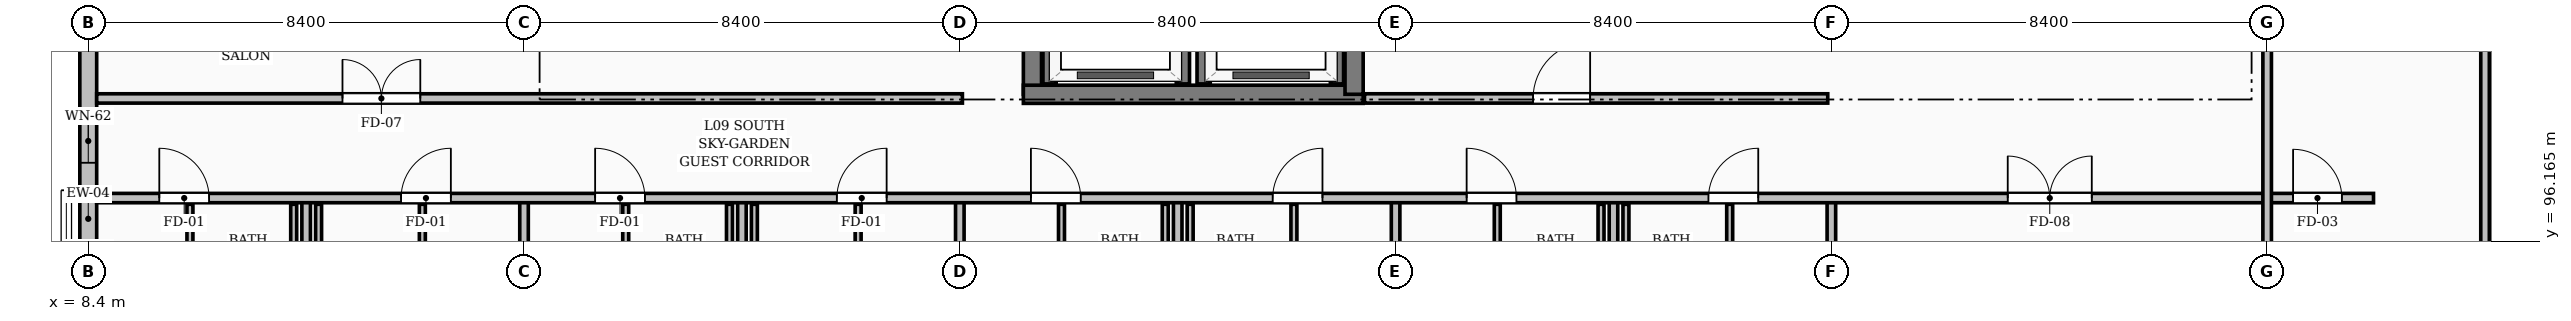
"""IFC4 building model, lengths in metres.
Left out: names, types, materials, properties, quantities, classifications, styles, units other than length and angle.
Written with IfcOpenShell. Run it as: python <this file> out.ifc"""

import sys

from ifc_helpers import new_model, si_unit, direction, frame, frame_2d, origin, place, context, subcontext, project, spatial, rectangle, extrude, element, fill, save


model = new_model("IFC4")
c1 = context("Model", 3, precision=1e-05, world=origin(), true_north=direction((0.0, 1.0)))
c2 = subcontext(c1, "Body", "Model", "MODEL_VIEW")
j1 = project(units=[si_unit("LENGTHUNIT", "METRE"), si_unit("PLANEANGLEUNIT", "RADIAN")], contexts=[c1])
p1 = place(None, origin())
s1 = spatial("IfcSite", under=j1, at=p1, CompositionType="ELEMENT")
p2 = place(p1, origin())
s2 = spatial("IfcBuilding", under=s1, at=p2, CompositionType="ELEMENT")
p3 = place(p2, frame((0.0, 0.0, 31.92)))
s3 = spatial("IfcBuildingStorey", under=s2, at=p3, CompositionType="ELEMENT", Elevation=31.92)
p4 = place(p3, frame((26.6, 99.0, 0.0), z_axis=(0.0, 0.0, 1.0), x_axis=(0.0, 1.0, 0.0)))
e1 = element("IfcWall", 1, at=p4, inside=s3, PredefinedType="SHEAR", context=c2, shape_type="SweptSolid", body=[
    extrude(rectangle(XDim=6.15, YDim=0.35, at=frame_2d((3.075, 0.0))), origin(), (0.0, 0.0, 1.0), 3.1),
])
p5 = place(p3, frame((26.425, 99.0, 0.0), z_axis=(0.0, 0.0, 1.0), x_axis=(1.0, 0.0, 0.0)))
e2 = element("IfcWall", 2, at=p5, inside=s3, PredefinedType="SHEAR", context=c2, shape_type="SweptSolid", body=[
    extrude(rectangle(XDim=6.55, YDim=0.35, at=frame_2d((3.275, 0.0))), origin(), (0.0, 0.0, 1.0), 3.1),
])
p6 = place(p3, frame((32.8, 99.0, 0.0), z_axis=(0.0, 0.0, 1.0), x_axis=(0.0, 1.0, 0.0)))
e3 = element("IfcWall", 3, at=p6, inside=s3, PredefinedType="SHEAR", context=c2, shape_type="SweptSolid", body=[
    extrude(rectangle(XDim=6.15, YDim=0.35, at=frame_2d((3.075, 0.0))), origin(), (0.0, 0.0, 1.0), 3.1),
])
p7 = place(p3, frame((8.4, 92.701, 0.0), z_axis=(0.0, 0.0, 1.0), x_axis=(0.0, 1.0, 0.0)))
e4 = element("IfcWall", 4, at=p7, inside=s3, PredefinedType="SOLIDWALL", context=c2, shape_type="SweptSolid", body=[
    extrude(rectangle(XDim=7.798, YDim=0.325, at=frame_2d((3.899, 0.0))), origin(), (0.0, 0.0, 1.0), 2.474),
])
p8 = place(p7, frame((2.429, 0.0, 0.3)))
e5 = element("IfcOpeningElement", 5, at=p8, cuts=e4, PredefinedType="OPENING", context=c2, shape_type="SweptSolid", body=[
    extrude(rectangle(XDim=0.84, YDim=1.75, at=frame_2d((0.42, 0.875))), frame((0.0, 0.172, 0.0), z_axis=(0.0, -1.0, 0.0), x_axis=(1.0, 0.0, 0.0)), (0.0, 0.0, 1.0), 0.345),
])
p9 = place(p7, frame((4.979, 0.0, 0.3)))
e6 = element("IfcOpeningElement", 6, at=p9, cuts=e4, PredefinedType="OPENING", context=c2, shape_type="SweptSolid", body=[
    extrude(rectangle(XDim=0.84, YDim=1.75, at=frame_2d((0.42, 0.875))), frame((0.0, 0.172, 0.0), z_axis=(0.0, -1.0, 0.0), x_axis=(1.0, 0.0, 0.0)), (0.0, 0.0, 1.0), 0.345),
])
for number, where, z_axis, x_axis in (
    (7, (26.93, 99.2, 0.0), (0.0, 0.0, 1.0), (0.0, 1.0, 0.0)),
    (8, (29.5, 99.2, 0.0), (0.0, 0.0, 1.0), (0.0, 1.0, 0.0)),
    (9, (29.9, 99.2, 0.0), (0.0, 0.0, 1.0), (0.0, 1.0, 0.0)),
    (10, (32.47, 99.2, 0.0), (0.0, 0.0, 1.0), (0.0, 1.0, 0.0)),
):
    element("IfcWall", number, at=place(p3, frame(where, z_axis=z_axis, x_axis=x_axis)), inside=s3, PredefinedType="SOLIDWALL", context=c2, shape_type="SweptSolid", body=[
        extrude(rectangle(XDim=2.2, YDim=0.255, at=frame_2d((1.1, 0.0))), origin(), (0.0, 0.0, 1.0), 3.1),
    ])
p10 = place(p3, frame((10.36, 94.73, 0.0), z_axis=(0.0, 0.0, 1.0), x_axis=(0.0, 1.0, 0.0)))
e11 = element("IfcWall", 11, at=p10, inside=s3, PredefinedType="PARTITIONING", context=c2, shape_type="SweptSolid", body=[
    extrude(rectangle(XDim=2.15, YDim=0.115, at=frame_2d((1.075, 0.0))), origin(), (0.0, 0.0, 1.0), 2.622),
])
for number, where, z_axis, x_axis in (
    (12, (12.36, 94.73, 0.0), (0.0, 0.0, 1.0), (0.0, 1.0, 0.0)),
    (13, (12.84, 94.73, 0.0), (0.0, 0.0, 1.0), (0.0, 1.0, 0.0)),
):
    element("IfcWall", number, at=place(p3, frame(where, z_axis=z_axis, x_axis=x_axis)), inside=s3, PredefinedType="PARTITIONING", context=c2, shape_type="SweptSolid", body=[
        extrude(rectangle(XDim=2.15, YDim=0.115, at=frame_2d((1.075, 0.0))), origin(), (0.0, 0.0, 1.0), 3.1),
    ])
p11 = place(p3, frame((14.84, 94.73, 0.0), z_axis=(0.0, 0.0, 1.0), x_axis=(0.0, 1.0, 0.0)))
e14 = element("IfcWall", 14, at=p11, inside=s3, PredefinedType="PARTITIONING", context=c2, shape_type="SweptSolid", body=[
    extrude(rectangle(XDim=2.15, YDim=0.115, at=frame_2d((1.075, 0.0))), origin(), (0.0, 0.0, 1.0), 2.622),
])
p12 = place(p3, frame((12.6, 92.562, 0.0), z_axis=(0.0, 0.0, 1.0), x_axis=(0.0, 1.0, 0.0)))
e15 = element("IfcWall", 15, at=p12, inside=s3, PredefinedType="PARTITIONING", context=c2, shape_type="SweptSolid", body=[
    extrude(rectangle(XDim=4.438, YDim=0.165, at=frame_2d((2.219, 0.0))), origin(), (0.0, 0.0, 1.0), 3.1),
])
for number, where, z_axis, x_axis in (
    (16, (18.76, 94.73, 0.0), (0.0, 0.0, 1.0), (0.0, 1.0, 0.0)),
    (17, (20.76, 94.73, 0.0), (0.0, 0.0, 1.0), (0.0, 1.0, 0.0)),
    (18, (21.24, 94.73, 0.0), (0.0, 0.0, 1.0), (0.0, 1.0, 0.0)),
    (19, (23.24, 94.73, 0.0), (0.0, 0.0, 1.0), (0.0, 1.0, 0.0)),
):
    element("IfcWall", number, at=place(p3, frame(where, z_axis=z_axis, x_axis=x_axis)), inside=s3, PredefinedType="PARTITIONING", context=c2, shape_type="SweptSolid", body=[
        extrude(rectangle(XDim=2.15, YDim=0.115, at=frame_2d((1.075, 0.0))), origin(), (0.0, 0.0, 1.0), 3.1),
    ])
p13 = place(p3, frame((21.0, 92.575, 0.0), z_axis=(0.0, 0.0, 1.0), x_axis=(0.0, 1.0, 0.0)))
e20 = element("IfcWall", 20, at=p13, inside=s3, PredefinedType="PARTITIONING", context=c2, shape_type="SweptSolid", body=[
    extrude(rectangle(XDim=4.425, YDim=0.165, at=frame_2d((2.212, 0.0))), origin(), (0.0, 0.0, 1.0), 3.1),
])
p14 = place(p3, frame((16.8, 92.75, 0.0), z_axis=(0.0, 0.0, 1.0), x_axis=(0.0, 1.0, 0.0)))
e21 = element("IfcWall", 21, at=p14, inside=s3, PredefinedType="PARTITIONING", context=c2, shape_type="SweptSolid", body=[
    extrude(rectangle(XDim=4.25, YDim=0.165, at=frame_2d((2.125, 0.0))), origin(), (0.0, 0.0, 1.0), 2.435),
])
p15 = place(p3, frame((27.16, 94.73, 0.0), z_axis=(0.0, 0.0, 1.0), x_axis=(0.0, 1.0, 0.0)))
e22 = element("IfcWall", 22, at=p15, inside=s3, PredefinedType="PARTITIONING", context=c2, shape_type="SweptSolid", body=[
    extrude(rectangle(XDim=2.15, YDim=0.115, at=frame_2d((1.075, 0.0))), origin(), (0.0, 0.0, 1.0), 2.622),
])
for number, where, z_axis, x_axis in (
    (23, (29.16, 94.73, 0.0), (0.0, 0.0, 1.0), (0.0, 1.0, 0.0)),
    (24, (29.64, 94.73, 0.0), (0.0, 0.0, 1.0), (0.0, 1.0, 0.0)),
):
    element("IfcWall", number, at=place(p3, frame(where, z_axis=z_axis, x_axis=x_axis)), inside=s3, PredefinedType="PARTITIONING", context=c2, shape_type="SweptSolid", body=[
        extrude(rectangle(XDim=2.15, YDim=0.115, at=frame_2d((1.075, 0.0))), origin(), (0.0, 0.0, 1.0), 3.1),
    ])
p16 = place(p3, frame((31.64, 94.73, 0.0), z_axis=(0.0, 0.0, 1.0), x_axis=(0.0, 1.0, 0.0)))
e25 = element("IfcWall", 25, at=p16, inside=s3, PredefinedType="PARTITIONING", context=c2, shape_type="SweptSolid", body=[
    extrude(rectangle(XDim=2.15, YDim=0.115, at=frame_2d((1.075, 0.0))), origin(), (0.0, 0.0, 1.0), 2.622),
])
p17 = place(p3, frame((29.4, 92.59, 0.0), z_axis=(0.0, 0.0, 1.0), x_axis=(0.0, 1.0, 0.0)))
e26 = element("IfcWall", 26, at=p17, inside=s3, PredefinedType="PARTITIONING", context=c2, shape_type="SweptSolid", body=[
    extrude(rectangle(XDim=4.41, YDim=0.165, at=frame_2d((2.205, 0.0))), origin(), (0.0, 0.0, 1.0), 3.1),
])
p18 = place(p3, frame((25.2, 92.75, 0.0), z_axis=(0.0, 0.0, 1.0), x_axis=(0.0, 1.0, 0.0)))
e27 = element("IfcWall", 27, at=p18, inside=s3, PredefinedType="PARTITIONING", context=c2, shape_type="SweptSolid", body=[
    extrude(rectangle(XDim=4.25, YDim=0.165, at=frame_2d((2.125, 0.0))), origin(), (0.0, 0.0, 1.0), 2.435),
])
for number, where, z_axis, x_axis in (
    (28, (35.56, 94.73, 0.0), (0.0, 0.0, 1.0), (0.0, 1.0, 0.0)),
    (29, (37.56, 94.73, 0.0), (0.0, 0.0, 1.0), (0.0, 1.0, 0.0)),
    (30, (38.04, 94.73, 0.0), (0.0, 0.0, 1.0), (0.0, 1.0, 0.0)),
    (31, (40.04, 94.73, 0.0), (0.0, 0.0, 1.0), (0.0, 1.0, 0.0)),
):
    element("IfcWall", number, at=place(p3, frame(where, z_axis=z_axis, x_axis=x_axis)), inside=s3, PredefinedType="PARTITIONING", context=c2, shape_type="SweptSolid", body=[
        extrude(rectangle(XDim=2.15, YDim=0.115, at=frame_2d((1.075, 0.0))), origin(), (0.0, 0.0, 1.0), 3.1),
    ])
p19 = place(p3, frame((37.8, 92.613, 0.0), z_axis=(0.0, 0.0, 1.0), x_axis=(0.0, 1.0, 0.0)))
e32 = element("IfcWall", 32, at=p19, inside=s3, PredefinedType="PARTITIONING", context=c2, shape_type="SweptSolid", body=[
    extrude(rectangle(XDim=4.387, YDim=0.165, at=frame_2d((2.194, 0.0))), origin(), (0.0, 0.0, 1.0), 3.1),
])
for number, where, z_axis, x_axis in (
    (33, (33.6, 92.75, 0.0), (0.0, 0.0, 1.0), (0.0, 1.0, 0.0)),
    (34, (42.0, 92.75, 0.0), (0.0, 0.0, 1.0), (0.0, 1.0, 0.0)),
):
    element("IfcWall", number, at=place(p3, frame(where, z_axis=z_axis, x_axis=x_axis)), inside=s3, PredefinedType="PARTITIONING", context=c2, shape_type="SweptSolid", body=[
        extrude(rectangle(XDim=4.25, YDim=0.165, at=frame_2d((2.125, 0.0))), origin(), (0.0, 0.0, 1.0), 2.435),
    ])
p20 = place(p3, frame((8.562, 97.0, 0.0), z_axis=(0.0, 0.0, 1.0), x_axis=(1.0, 0.0, 0.0)))
e35 = element("IfcWall", 35, at=p20, inside=s3, PredefinedType="PARTITIONING", context=c2, shape_type="SweptSolid", body=[
    extrude(rectangle(XDim=41.837, YDim=0.18, at=frame_2d((20.919, 0.0))), origin(), (0.0, 0.0, 1.0), 3.1),
])
p21 = place(p20, frame((1.207, 0.0, 0.0)))
e36 = element("IfcOpeningElement", 36, at=p21, cuts=e35, PredefinedType="OPENING", context=c2, shape_type="SweptSolid", body=[
    extrude(rectangle(XDim=0.96, YDim=2.15, at=frame_2d((0.48, 1.075))), frame((0.0, 0.1, 0.0), z_axis=(0.0, -1.0, 0.0), x_axis=(1.0, 0.0, 0.0)), (0.0, 0.0, 1.0), 0.2),
])
p22 = place(p20, frame((5.867, 0.0, 0.0)))
e37 = element("IfcOpeningElement", 37, at=p22, cuts=e35, PredefinedType="OPENING", context=c2, shape_type="SweptSolid", body=[
    extrude(rectangle(XDim=0.96, YDim=2.15, at=frame_2d((0.48, 1.075))), frame((0.0, 0.1, 0.0), z_axis=(0.0, -1.0, 0.0), x_axis=(1.0, 0.0, 0.0)), (0.0, 0.0, 1.0), 0.2),
])
p23 = place(p20, frame((9.608, 0.0, 0.0)))
e38 = element("IfcOpeningElement", 38, at=p23, cuts=e35, PredefinedType="OPENING", context=c2, shape_type="SweptSolid", body=[
    extrude(rectangle(XDim=0.96, YDim=2.15, at=frame_2d((0.48, 1.075))), frame((0.0, 0.1, 0.0), z_axis=(0.0, -1.0, 0.0), x_axis=(1.0, 0.0, 0.0)), (0.0, 0.0, 1.0), 0.2),
])
p24 = place(p20, frame((14.267, 0.0, 0.0)))
e39 = element("IfcOpeningElement", 39, at=p24, cuts=e35, PredefinedType="OPENING", context=c2, shape_type="SweptSolid", body=[
    extrude(rectangle(XDim=0.96, YDim=2.15, at=frame_2d((0.48, 1.075))), frame((0.0, 0.1, 0.0), z_axis=(0.0, -1.0, 0.0), x_axis=(1.0, 0.0, 0.0)), (0.0, 0.0, 1.0), 0.2),
])
p25 = place(p20, frame((18.008, 0.0, 0.0)))
e40 = element("IfcOpeningElement", 40, at=p25, cuts=e35, PredefinedType="OPENING", context=c2, shape_type="SweptSolid", body=[
    extrude(rectangle(XDim=0.96, YDim=2.15, at=frame_2d((0.48, 1.075))), frame((0.0, 0.1, 0.0), z_axis=(0.0, -1.0, 0.0), x_axis=(1.0, 0.0, 0.0)), (0.0, 0.0, 1.0), 0.2),
])
p26 = place(p20, frame((22.668, 0.0, 0.0)))
e41 = element("IfcOpeningElement", 41, at=p26, cuts=e35, PredefinedType="OPENING", context=c2, shape_type="SweptSolid", body=[
    extrude(rectangle(XDim=0.96, YDim=2.15, at=frame_2d((0.48, 1.075))), frame((0.0, 0.1, 0.0), z_axis=(0.0, -1.0, 0.0), x_axis=(1.0, 0.0, 0.0)), (0.0, 0.0, 1.0), 0.2),
])
p27 = place(p20, frame((26.407, 0.0, 0.0)))
e42 = element("IfcOpeningElement", 42, at=p27, cuts=e35, PredefinedType="OPENING", context=c2, shape_type="SweptSolid", body=[
    extrude(rectangle(XDim=0.96, YDim=2.15, at=frame_2d((0.48, 1.075))), frame((0.0, 0.1, 0.0), z_axis=(0.0, -1.0, 0.0), x_axis=(1.0, 0.0, 0.0)), (0.0, 0.0, 1.0), 0.2),
])
p28 = place(p20, frame((31.068, 0.0, 0.0)))
e43 = element("IfcOpeningElement", 43, at=p28, cuts=e35, PredefinedType="OPENING", context=c2, shape_type="SweptSolid", body=[
    extrude(rectangle(XDim=0.96, YDim=2.15, at=frame_2d((0.48, 1.075))), frame((0.0, 0.1, 0.0), z_axis=(0.0, -1.0, 0.0), x_axis=(1.0, 0.0, 0.0)), (0.0, 0.0, 1.0), 0.2),
])
p29 = place(p20, frame((36.837, 0.0, 0.0)))
e44 = element("IfcOpeningElement", 44, at=p29, cuts=e35, PredefinedType="OPENING", context=c2, shape_type="SweptSolid", body=[
    extrude(rectangle(XDim=1.62, YDim=2.2, at=frame_2d((0.81, 1.1))), frame((0.0, 0.1, 0.0), z_axis=(0.0, -1.0, 0.0), x_axis=(1.0, 0.0, 0.0)), (0.0, 0.0, 1.0), 0.2),
])
p30 = place(p3, frame((8.562, 98.92, 0.0), z_axis=(0.0, 0.0, 1.0), x_axis=(1.0, 0.0, 0.0)))
e45 = element("IfcWall", 45, at=p30, inside=s3, PredefinedType="PARTITIONING", context=c2, shape_type="SweptSolid", body=[
    extrude(rectangle(XDim=16.688, YDim=0.18, at=frame_2d((8.344, 0.0))), origin(), (0.0, 0.0, 1.0), 3.1),
])
p31 = place(p30, frame((4.738, 0.0, 0.0)))
e46 = element("IfcOpeningElement", 46, at=p31, cuts=e45, PredefinedType="OPENING", context=c2, shape_type="SweptSolid", body=[
    extrude(rectangle(XDim=1.5, YDim=2.2, at=frame_2d((0.75, 1.1))), frame((0.0, 0.1, 0.0), z_axis=(0.0, -1.0, 0.0), x_axis=(1.0, 0.0, 0.0)), (0.0, 0.0, 1.0), 0.2),
])
p32 = place(p3, frame((33.0, 98.92, 0.0), z_axis=(0.0, 0.0, 1.0), x_axis=(1.0, 0.0, 0.0)))
e47 = element("IfcWall", 47, at=p32, inside=s3, PredefinedType="PARTITIONING", context=c2, shape_type="SweptSolid", body=[
    extrude(rectangle(XDim=8.93, YDim=0.18, at=frame_2d((4.465, 0.0))), origin(), (0.0, 0.0, 1.0), 3.1),
])
p33 = place(p32, frame((3.25, 0.0, 0.0)))
e48 = element("IfcOpeningElement", 48, at=p33, cuts=e47, PredefinedType="OPENING", context=c2, shape_type="SweptSolid", body=[
    extrude(rectangle(XDim=1.1, YDim=2.1, at=frame_2d((0.55, 1.05))), frame((0.0, 0.1, 0.0), z_axis=(0.0, -1.0, 0.0), x_axis=(1.0, 0.0, 0.0)), (0.0, 0.0, 1.0), 0.2),
])
p34 = place(p3, frame((50.4, 97.0, 0.0), z_axis=(0.0, 0.0, 1.0), x_axis=(1.0, 0.0, 0.0)))
e49 = element("IfcWall", 49, at=p34, inside=s3, PredefinedType="PARTITIONING", context=c2, shape_type="SweptSolid", body=[
    extrude(rectangle(XDim=2.05, YDim=0.18, at=frame_2d((1.025, 0.0))), origin(), (0.0, 0.0, 1.0), 3.1),
])
p35 = place(p34, frame((0.5, 0.0, 0.0)))
e50 = element("IfcOpeningElement", 50, at=p35, cuts=e49, PredefinedType="OPENING", context=c2, shape_type="SweptSolid", body=[
    extrude(rectangle(XDim=0.94, YDim=2.1, at=frame_2d((0.47, 1.05))), frame((0.0, 0.1, 0.0), z_axis=(0.0, -1.0, 0.0), x_axis=(1.0, 0.0, 0.0)), (0.0, 0.0, 1.0), 0.2),
])
p36 = place(p3, frame((54.6, 92.53, 0.0), z_axis=(0.0, 0.0, 1.0), x_axis=(0.0, 1.0, 0.0)))
e51 = element("IfcWall", 51, at=p36, inside=s3, PredefinedType="PARTITIONING", context=c2, shape_type="SweptSolid", body=[
    extrude(rectangle(XDim=12.57, YDim=0.165, at=frame_2d((6.285, 0.0))), origin(), (0.0, 0.0, 1.0), 3.1),
])
p37 = place(p3, frame((50.4, 92.75, 0.0), z_axis=(0.0, 0.0, 1.0), x_axis=(0.0, 1.0, 0.0)))
e52 = element("IfcWall", 52, at=p37, inside=s3, PredefinedType="PARTITIONING", context=c2, shape_type="SweptSolid", body=[
    extrude(rectangle(XDim=12.35, YDim=0.165, at=frame_2d((6.175, 0.0))), origin(), (0.0, 0.0, 1.0), 2.375),
])
p38 = place(p9, origin())
e53 = element("IfcWindow", 53, at=p38, inside=s3, PartitioningType="SINGLE_PANEL", PredefinedType="WINDOW", context=c2, shape_type="SweptSolid", body=[
    extrude(rectangle(XDim=0.84, YDim=1.75, at=frame_2d((0.42, 0.875))), frame((0.0, 0.03, 0.0), z_axis=(0.0, -1.0, 0.0), x_axis=(1.0, 0.0, 0.0)), (0.0, 0.0, 1.0), 0.06),
])
fill(e6, e53)
p39 = place(p21, origin())
e54 = element("IfcDoor", 54, at=p39, inside=s3, OperationType="SINGLE_SWING_LEFT", PredefinedType="DOOR", context=c2, shape_type="SweptSolid", body=[
    extrude(rectangle(XDim=0.96, YDim=2.15, at=frame_2d((0.48, 1.075))), frame((0.0, 0.025, 0.0), z_axis=(0.0, -1.0, 0.0), x_axis=(1.0, 0.0, 0.0)), (0.0, 0.0, 1.0), 0.05),
])
fill(e36, e54)
p40 = place(p22, origin())
e55 = element("IfcDoor", 55, at=p40, inside=s3, OperationType="SINGLE_SWING_RIGHT", PredefinedType="DOOR", context=c2, shape_type="SweptSolid", body=[
    extrude(rectangle(XDim=0.96, YDim=2.15, at=frame_2d((0.48, 1.075))), frame((0.0, 0.025, 0.0), z_axis=(0.0, -1.0, 0.0), x_axis=(1.0, 0.0, 0.0)), (0.0, 0.0, 1.0), 0.05),
])
fill(e37, e55)
p41 = place(p23, origin())
e56 = element("IfcDoor", 56, at=p41, inside=s3, OperationType="SINGLE_SWING_LEFT", PredefinedType="DOOR", context=c2, shape_type="SweptSolid", body=[
    extrude(rectangle(XDim=0.96, YDim=2.15, at=frame_2d((0.48, 1.075))), frame((0.0, 0.025, 0.0), z_axis=(0.0, -1.0, 0.0), x_axis=(1.0, 0.0, 0.0)), (0.0, 0.0, 1.0), 0.05),
])
fill(e38, e56)
p42 = place(p24, origin())
e57 = element("IfcDoor", 57, at=p42, inside=s3, OperationType="SINGLE_SWING_RIGHT", PredefinedType="DOOR", context=c2, shape_type="SweptSolid", body=[
    extrude(rectangle(XDim=0.96, YDim=2.15, at=frame_2d((0.48, 1.075))), frame((0.0, 0.025, 0.0), z_axis=(0.0, -1.0, 0.0), x_axis=(1.0, 0.0, 0.0)), (0.0, 0.0, 1.0), 0.05),
])
fill(e39, e57)
p43 = place(p25, origin())
e58 = element("IfcDoor", 58, at=p43, inside=s3, OperationType="SINGLE_SWING_LEFT", PredefinedType="DOOR", context=c2, shape_type="SweptSolid", body=[
    extrude(rectangle(XDim=0.96, YDim=2.15, at=frame_2d((0.48, 1.075))), frame((0.0, 0.025, 0.0), z_axis=(0.0, -1.0, 0.0), x_axis=(1.0, 0.0, 0.0)), (0.0, 0.0, 1.0), 0.05),
])
fill(e40, e58)
p44 = place(p26, origin())
e59 = element("IfcDoor", 59, at=p44, inside=s3, OperationType="SINGLE_SWING_RIGHT", PredefinedType="DOOR", context=c2, shape_type="SweptSolid", body=[
    extrude(rectangle(XDim=0.96, YDim=2.15, at=frame_2d((0.48, 1.075))), frame((0.0, 0.025, 0.0), z_axis=(0.0, -1.0, 0.0), x_axis=(1.0, 0.0, 0.0)), (0.0, 0.0, 1.0), 0.05),
])
fill(e41, e59)
p45 = place(p27, origin())
e60 = element("IfcDoor", 60, at=p45, inside=s3, OperationType="SINGLE_SWING_LEFT", PredefinedType="DOOR", context=c2, shape_type="SweptSolid", body=[
    extrude(rectangle(XDim=0.96, YDim=2.15, at=frame_2d((0.48, 1.075))), frame((0.0, 0.025, 0.0), z_axis=(0.0, -1.0, 0.0), x_axis=(1.0, 0.0, 0.0)), (0.0, 0.0, 1.0), 0.05),
])
fill(e42, e60)
p46 = place(p28, origin())
e61 = element("IfcDoor", 61, at=p46, inside=s3, OperationType="SINGLE_SWING_RIGHT", PredefinedType="DOOR", context=c2, shape_type="SweptSolid", body=[
    extrude(rectangle(XDim=0.96, YDim=2.15, at=frame_2d((0.48, 1.075))), frame((0.0, 0.025, 0.0), z_axis=(0.0, -1.0, 0.0), x_axis=(1.0, 0.0, 0.0)), (0.0, 0.0, 1.0), 0.05),
])
fill(e43, e61)
p47 = place(p29, origin())
e62 = element("IfcDoor", 62, at=p47, inside=s3, OperationType="DOUBLE_DOOR_SINGLE_SWING", PredefinedType="DOOR", context=c2, shape_type="SweptSolid", body=[
    extrude(rectangle(XDim=1.62, YDim=2.2, at=frame_2d((0.81, 1.1))), frame((0.0, 0.025, 0.0), z_axis=(0.0, -1.0, 0.0), x_axis=(1.0, 0.0, 0.0)), (0.0, 0.0, 1.0), 0.05),
])
fill(e44, e62)
p48 = place(p31, origin())
e63 = element("IfcDoor", 63, at=p48, inside=s3, OperationType="DOUBLE_DOOR_SINGLE_SWING", PredefinedType="DOOR", context=c2, shape_type="SweptSolid", body=[
    extrude(rectangle(XDim=1.5, YDim=2.2, at=frame_2d((0.75, 1.1))), frame((0.0, 0.025, 0.0), z_axis=(0.0, -1.0, 0.0), x_axis=(1.0, 0.0, 0.0)), (0.0, 0.0, 1.0), 0.05),
])
fill(e46, e63)
p49 = place(p33, origin())
e64 = element("IfcDoor", 64, at=p49, inside=s3, OperationType="SINGLE_SWING_RIGHT", PredefinedType="DOOR", context=c2, shape_type="SweptSolid", body=[
    extrude(rectangle(XDim=1.1, YDim=2.1, at=frame_2d((0.55, 1.05))), frame((0.0, 0.025, 0.0), z_axis=(0.0, -1.0, 0.0), x_axis=(1.0, 0.0, 0.0)), (0.0, 0.0, 1.0), 0.05),
])
fill(e48, e64)
p50 = place(p35, origin())
e65 = element("IfcDoor", 65, at=p50, inside=s3, OperationType="SINGLE_SWING_LEFT", PredefinedType="DOOR", context=c2, shape_type="SweptSolid", body=[
    extrude(rectangle(XDim=0.94, YDim=2.1, at=frame_2d((0.47, 1.05))), frame((0.0, 0.025, 0.0), z_axis=(0.0, -1.0, 0.0), x_axis=(1.0, 0.0, 0.0)), (0.0, 0.0, 1.0), 0.05),
])
fill(e50, e65)
save(model, sys.argv[1])
